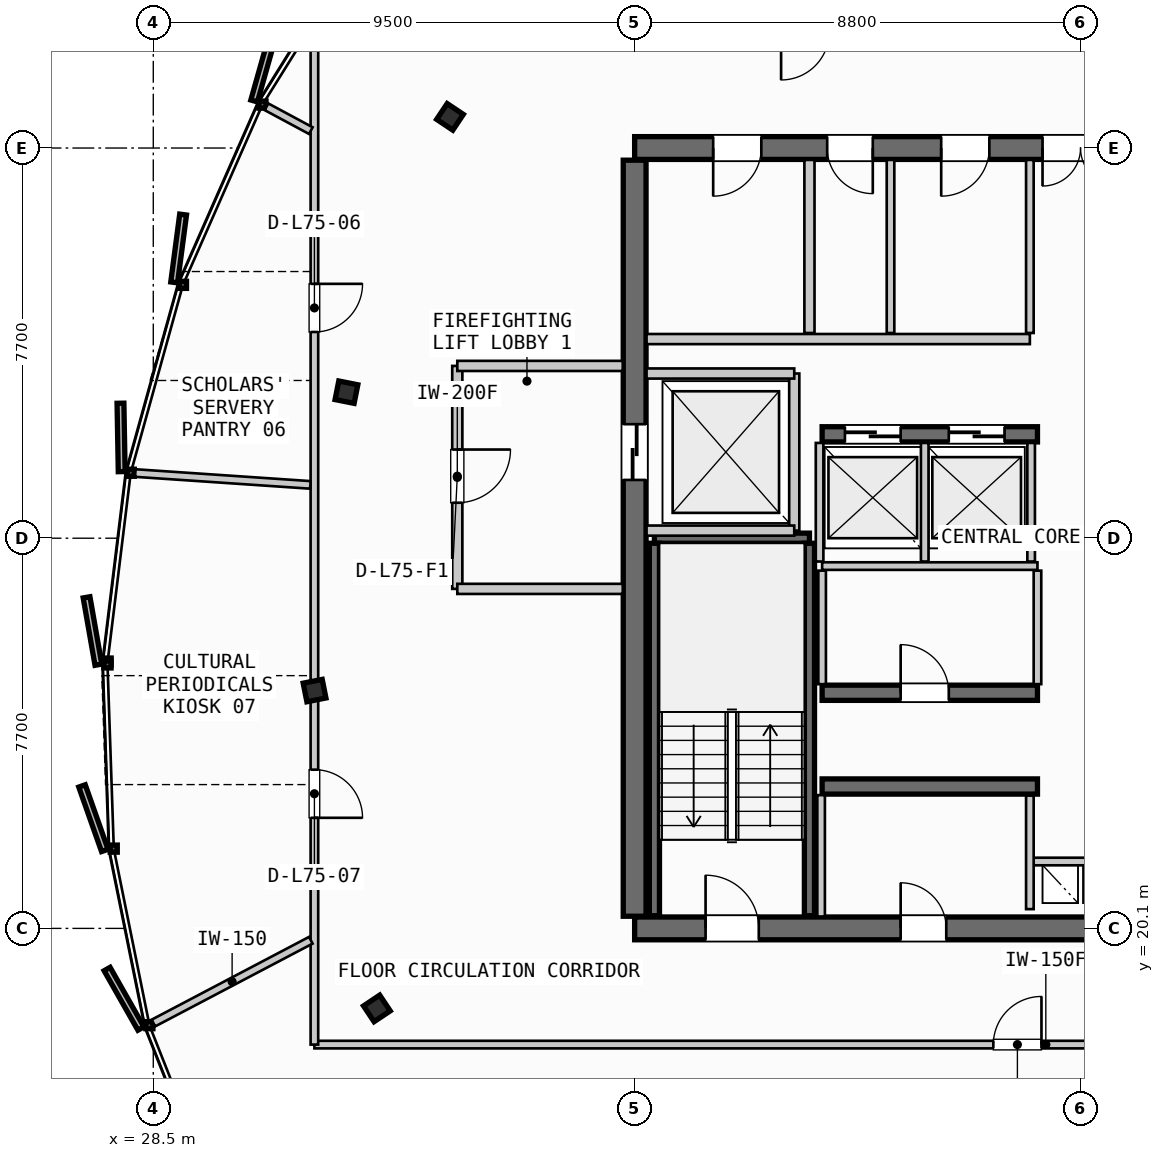
"""IFC4 building model, lengths in metres.
Left out: names, types, materials, properties, quantities, classifications, styles, units other than length and angle.
Written with IfcOpenShell. Run it as: python <this file> out.ifc"""

import sys

from ifc_helpers import new_model, si_unit, direction, frame, frame_2d, origin, origin_2d, place, context, subcontext, project, spatial, rectangle, i_section, extrude, source, transform, mapped, element, fill, save


model = new_model("IFC4")
c1 = context("Model", 3, precision=1e-05, world=origin(), true_north=direction((0.0, 1.0)))
c2 = subcontext(c1, "Body", "Model", "MODEL_VIEW")
j1 = project(units=[si_unit("LENGTHUNIT", "METRE"), si_unit("PLANEANGLEUNIT", "RADIAN")], contexts=[c1])
p1 = place(None, origin())
s1 = spatial("IfcSite", under=j1, at=p1, CompositionType="ELEMENT")
p2 = place(p1, origin())
s2 = spatial("IfcBuilding", under=s1, at=p2, CompositionType="ELEMENT")
p3 = place(p2, frame((0.0, 0.0, 283.6)))
s3 = spatial("IfcBuildingStorey", under=s2, at=p3, CompositionType="ELEMENT", Elevation=283.6)
p4 = place(p3, frame((38.0, 20.1, 0.0), z_axis=(0.0, 0.0, 1.0), x_axis=(1.0, 0.0, 0.0)))
e1 = element("IfcWall", 1, at=p4, inside=s3, PredefinedType="SHEAR", context=c2, shape_type="SweptSolid", body=[
    extrude(rectangle(XDim=17.6, YDim=0.45, at=frame_2d((8.8, 0.0))), origin(), (0.0, 0.0, 1.0), 3.21),
])
p5 = place(p4, frame((1.4, 0.0, 0.0)))
e2 = element("IfcOpeningElement", 2, at=p5, cuts=e1, PredefinedType="OPENING", context=c2, shape_type="SweptSolid", body=[
    extrude(rectangle(XDim=1.05, YDim=2.15, at=frame_2d((0.525, 1.075))), frame((0.0, 0.235, 0.0), z_axis=(0.0, -1.0, 0.0), x_axis=(1.0, 0.0, 0.0)), (0.0, 0.0, 1.0), 0.47),
])
p6 = place(p4, frame((15.15, 0.0, 0.0)))
e3 = element("IfcOpeningElement", 3, at=p6, cuts=e1, PredefinedType="OPENING", context=c2, shape_type="SweptSolid", body=[
    extrude(rectangle(XDim=1.05, YDim=2.15, at=frame_2d((0.525, 1.075))), frame((0.0, 0.235, 0.0), z_axis=(0.0, -1.0, 0.0), x_axis=(1.0, 0.0, 0.0)), (0.0, 0.0, 1.0), 0.47),
])
p7 = place(p4, frame((5.25, 0.0, 0.0)))
e4 = element("IfcOpeningElement", 4, at=p7, cuts=e1, PredefinedType="OPENING", context=c2, shape_type="SweptSolid", body=[
    extrude(rectangle(XDim=0.9, YDim=2.15, at=frame_2d((0.45, 1.075))), frame((0.0, 0.235, 0.0), z_axis=(0.0, -1.0, 0.0), x_axis=(1.0, 0.0, 0.0)), (0.0, 0.0, 1.0), 0.47),
])
p8 = place(p4, frame((11.4, 0.0, 0.0)))
e5 = element("IfcOpeningElement", 5, at=p8, cuts=e1, PredefinedType="OPENING", context=c2, shape_type="SweptSolid", body=[
    extrude(rectangle(XDim=0.95, YDim=2.15, at=frame_2d((0.475, 1.075))), frame((0.0, 0.235, 0.0), z_axis=(0.0, -1.0, 0.0), x_axis=(1.0, 0.0, 0.0)), (0.0, 0.0, 1.0), 0.47),
])
p9 = place(p3, frame((55.6, 35.5, 0.0), z_axis=(0.0, 0.0, 1.0), x_axis=(-1.0, 0.0, 0.0)))
e6 = element("IfcWall", 6, at=p9, inside=s3, PredefinedType="SHEAR", context=c2, shape_type="SweptSolid", body=[
    extrude(rectangle(XDim=17.6, YDim=0.45, at=frame_2d((8.8, 0.0))), origin(), (0.0, 0.0, 1.0), 3.21),
])
p10 = place(p9, frame((8.05, 0.0, 0.0)))
e7 = element("IfcOpeningElement", 7, at=p10, cuts=e6, PredefinedType="OPENING", context=c2, shape_type="SweptSolid", body=[
    extrude(rectangle(XDim=1.5, YDim=2.2, at=frame_2d((0.75, 1.1))), frame((0.0, 0.235, 0.0), z_axis=(0.0, -1.0, 0.0), x_axis=(1.0, 0.0, 0.0)), (0.0, 0.0, 1.0), 0.47),
])
p11 = place(p9, frame((15.1, 0.0, 0.0)))
e8 = element("IfcOpeningElement", 8, at=p11, cuts=e6, PredefinedType="OPENING", context=c2, shape_type="SweptSolid", body=[
    extrude(rectangle(XDim=0.95, YDim=2.15, at=frame_2d((0.475, 1.075))), frame((0.0, 0.235, 0.0), z_axis=(0.0, -1.0, 0.0), x_axis=(1.0, 0.0, 0.0)), (0.0, 0.0, 1.0), 0.47),
])
p12 = place(p9, frame((12.9, 0.0, 0.0)))
e9 = element("IfcOpeningElement", 9, at=p12, cuts=e6, PredefinedType="OPENING", context=c2, shape_type="SweptSolid", body=[
    extrude(rectangle(XDim=0.9, YDim=2.15, at=frame_2d((0.45, 1.075))), frame((0.0, 0.235, 0.0), z_axis=(0.0, -1.0, 0.0), x_axis=(1.0, 0.0, 0.0)), (0.0, 0.0, 1.0), 0.47),
])
p13 = place(p9, frame((10.6, 0.0, 0.0)))
e10 = element("IfcOpeningElement", 10, at=p13, cuts=e6, PredefinedType="OPENING", context=c2, shape_type="SweptSolid", body=[
    extrude(rectangle(XDim=0.95, YDim=2.15, at=frame_2d((0.475, 1.075))), frame((0.0, 0.235, 0.0), z_axis=(0.0, -1.0, 0.0), x_axis=(1.0, 0.0, 0.0)), (0.0, 0.0, 1.0), 0.47),
])
p14 = place(p3, frame((38.0, 35.26, 0.0), z_axis=(0.0, 0.0, 1.0), x_axis=(0.0, -1.0, 0.0)))
e11 = element("IfcWall", 11, at=p14, inside=s3, PredefinedType="SHEAR", context=c2, shape_type="SweptSolid", body=[
    extrude(rectangle(XDim=14.92, YDim=0.45, at=frame_2d((7.46, 0.0))), origin(), (0.0, 0.0, 1.0), 3.21),
])
p15 = place(p14, frame((5.21, 0.0, 0.0)))
e12 = element("IfcOpeningElement", 12, at=p15, cuts=e11, PredefinedType="OPENING", context=c2, shape_type="SweptSolid", body=[
    extrude(rectangle(XDim=1.1, YDim=2.2, at=frame_2d((0.55, 1.1))), frame((0.0, 0.235, 0.0), z_axis=(0.0, -1.0, 0.0), x_axis=(1.0, 0.0, 0.0)), (0.0, 0.0, 1.0), 0.47),
])
p16 = place(p3, frame((41.7, 22.9, 0.0), z_axis=(0.0, 0.0, 1.0), x_axis=(1.0, 0.0, 0.0)))
e13 = element("IfcWall", 13, at=p16, inside=s3, PredefinedType="SHEAR", context=c2, shape_type="SweptSolid", body=[
    extrude(rectangle(XDim=4.25, YDim=0.3, at=frame_2d((2.125, 0.0))), origin(), (0.0, 0.0, 1.0), 3.21),
])
p17 = place(p3, frame((41.7, 24.75, 0.0), z_axis=(0.0, 0.0, 1.0), x_axis=(1.0, 0.0, 0.0)))
e14 = element("IfcWall", 14, at=p17, inside=s3, PredefinedType="SHEAR", context=c2, shape_type="SweptSolid", body=[
    extrude(rectangle(XDim=4.25, YDim=0.3, at=frame_2d((2.125, 0.0))), origin(), (0.0, 0.0, 1.0), 3.21),
])
p18 = place(p17, frame((1.55, 0.0, 0.0)))
e15 = element("IfcOpeningElement", 15, at=p18, cuts=e14, PredefinedType="OPENING", context=c2, shape_type="SweptSolid", body=[
    extrude(rectangle(XDim=0.95, YDim=2.15, at=frame_2d((0.475, 1.075))), frame((0.0, 0.16, 0.0), z_axis=(0.0, -1.0, 0.0), x_axis=(1.0, 0.0, 0.0)), (0.0, 0.0, 1.0), 0.32),
])
p19 = place(p3, frame((41.7, 29.85, 0.0), z_axis=(0.0, 0.0, 1.0), x_axis=(1.0, 0.0, 0.0)))
e16 = element("IfcWall", 16, at=p19, inside=s3, PredefinedType="SHEAR", context=c2, shape_type="SweptSolid", body=[
    extrude(rectangle(XDim=4.25, YDim=0.3, at=frame_2d((2.125, 0.0))), origin(), (0.0, 0.0, 1.0), 3.21),
])
p20 = place(p19, frame((0.45, 0.0, 0.0)))
e17 = element("IfcOpeningElement", 17, at=p20, cuts=e16, PredefinedType="OPENING", context=c2, shape_type="SweptSolid", body=[
    extrude(rectangle(XDim=1.1, YDim=2.2, at=frame_2d((0.55, 1.1))), frame((0.0, 0.16, 0.0), z_axis=(0.0, -1.0, 0.0), x_axis=(1.0, 0.0, 0.0)), (0.0, 0.0, 1.0), 0.32),
])
p21 = place(p19, frame((2.5, 0.0, 0.0)))
e18 = element("IfcOpeningElement", 18, at=p21, cuts=e16, PredefinedType="OPENING", context=c2, shape_type="SweptSolid", body=[
    extrude(rectangle(XDim=1.1, YDim=2.2, at=frame_2d((0.55, 1.1))), frame((0.0, 0.16, 0.0), z_axis=(0.0, -1.0, 0.0), x_axis=(1.0, 0.0, 0.0)), (0.0, 0.0, 1.0), 0.32),
])
m1 = source(origin(), c2, "Body", "SweptSolid", [
    extrude(i_section(OverallWidth=0.374, OverallDepth=0.383, WebThickness=0.017, FlangeThickness=0.026, FilletRadius=0.015, at=origin_2d()), origin(), (0.0, 0.0, 1.0), 3.21),
])
for number, where, z_axis, x_axis in (
    (19, (34.356, 36.115, 0.0), (0.0, 0.0, 1.0), (-0.831, 0.556, 0.0)),
    (20, (32.312, 30.682, 0.0), (0.0, 0.0, 1.0), (-0.981, 0.195, 0.0)),
    (21, (31.683, 24.793, 0.0), (0.0, 0.0, 1.0), (-0.981, -0.195, 0.0)),
    (22, (32.913, 18.521, 0.0), (0.0, 0.0, 1.0), (-0.831, -0.556, 0.0)),
):
    element("IfcColumn", number, at=place(p3, frame(where, z_axis=z_axis, x_axis=x_axis)), inside=s3, PredefinedType="COLUMN", context=c2, shape_type="MappedRepresentation", body=[
        mapped(m1, transform((0.0, 0.0, 0.0), scale=1.0)),
    ])
p22 = place(p3, frame((38.39, 27.8, 0.0), z_axis=(0.0, 0.0, 1.0), x_axis=(1.0, 0.0, 0.0)))
e23 = element("IfcWall", 23, at=p22, inside=s3, PredefinedType="SHEAR", context=c2, shape_type="SweptSolid", body=[
    extrude(rectangle(XDim=3.06, YDim=0.2, at=frame_2d((1.53, 0.0))), origin(), (0.0, 0.0, 1.0), 3.21),
])
for number, where, z_axis, x_axis in (
    (24, (41.45, 27.7, 0.0), (0.0, 0.0, 1.0), (0.0, -1.0, 0.0)),
    (25, (38.39, 20.35, 0.0), (0.0, 0.0, 1.0), (0.0, 1.0, 0.0)),
):
    element("IfcWall", number, at=place(p3, frame(where, z_axis=z_axis, x_axis=x_axis)), inside=s3, PredefinedType="SHEAR", context=c2, shape_type="SweptSolid", body=[
        extrude(rectangle(XDim=7.35, YDim=0.2, at=frame_2d((3.675, 0.0))), origin(), (0.0, 0.0, 1.0), 3.21),
    ])
p23 = place(p3, frame((45.8, 21.42, 0.0), z_axis=(0.0, 0.0, 1.0), x_axis=(1.0, 0.0, 0.0)))
e26 = element("IfcWall", 26, at=p23, inside=s3, PredefinedType="PARTITIONING", context=c2, shape_type="SweptSolid", body=[
    extrude(rectangle(XDim=2.0, YDim=0.15, at=frame_2d((1.0, 0.0))), origin(), (0.0, 0.0, 1.0), 2.455),
])
p24 = place(p3, frame((45.8, 20.48, 0.0), z_axis=(0.0, 0.0, 1.0), x_axis=(0.0, 1.0, 0.0)))
e27 = element("IfcWall", 27, at=p24, inside=s3, PredefinedType="PARTITIONING", context=c2, shape_type="SweptSolid", body=[
    extrude(rectangle(XDim=2.24, YDim=0.15, at=frame_2d((1.12, 0.0))), origin(), (0.0, 0.0, 1.0), 2.455),
])
p25 = place(p3, frame((41.15, 27.95, 0.0), z_axis=(0.0, 0.0, 1.0), x_axis=(0.0, 1.0, 0.0)))
e28 = element("IfcWall", 28, at=p25, inside=s3, PredefinedType="PARTITIONING", context=c2, shape_type="SweptSolid", body=[
    extrude(rectangle(XDim=3.1, YDim=0.2, at=frame_2d((1.55, 0.0))), origin(), (0.0, 0.0, 1.0), 2.455),
])
for number, where, z_axis, x_axis in (
    (29, (38.235, 27.95, 0.0), (0.0, 0.0, 1.0), (1.0, 0.0, 0.0)),
    (30, (38.235, 31.05, 0.0), (0.0, 0.0, 1.0), (1.0, 0.0, 0.0)),
):
    element("IfcWall", number, at=place(p3, frame(where, z_axis=z_axis, x_axis=x_axis)), inside=s3, PredefinedType="PARTITIONING", context=c2, shape_type="SweptSolid", body=[
        extrude(rectangle(XDim=2.915, YDim=0.2, at=frame_2d((1.458, 0.0))), origin(), (0.0, 0.0, 1.0), 2.455),
    ])
p26 = place(p3, frame((34.5, 31.2, 0.0), z_axis=(0.0, 0.0, 1.0), x_axis=(0.0, -1.0, 0.0)))
e31 = element("IfcWall", 31, at=p26, inside=s3, PredefinedType="PARTITIONING", context=c2, shape_type="SweptSolid", body=[
    extrude(rectangle(XDim=4.4, YDim=0.2, at=frame_2d((2.2, 0.0))), origin(), (0.0, 0.0, 1.0), 2.455),
])
p27 = place(p26, frame((1.65, 0.0, 0.0)))
e32 = element("IfcOpeningElement", 32, at=p27, cuts=e31, PredefinedType="OPENING", context=c2, shape_type="SweptSolid", body=[
    extrude(rectangle(XDim=1.05, YDim=2.15, at=frame_2d((0.525, 1.075))), frame((0.0, 0.11, 0.0), z_axis=(0.0, -1.0, 0.0), x_axis=(1.0, 0.0, 0.0)), (0.0, 0.0, 1.0), 0.22),
])
for number, where, z_axis, x_axis in (
    (33, (34.5, 26.8, 0.0), (0.0, 0.0, 1.0), (1.0, 0.0, 0.0)),
    (34, (34.5, 31.2, 0.0), (0.0, 0.0, 1.0), (1.0, 0.0, 0.0)),
):
    element("IfcWall", number, at=place(p3, frame(where, z_axis=z_axis, x_axis=x_axis)), inside=s3, PredefinedType="PARTITIONING", context=c2, shape_type="SweptSolid", body=[
        extrude(rectangle(XDim=3.265, YDim=0.2, at=frame_2d((1.632, 0.0))), origin(), (0.0, 0.0, 1.0), 2.455),
    ])
p28 = place(p3, frame((41.68, 20.335, 0.0), z_axis=(0.0, 0.0, 1.0), x_axis=(0.0, 1.0, 0.0)))
e35 = element("IfcWall", 35, at=p28, inside=s3, PredefinedType="PARTITIONING", context=c2, shape_type="SweptSolid", body=[
    extrude(rectangle(XDim=2.395, YDim=0.15, at=frame_2d((1.198, 0.0))), origin(), (0.0, 0.0, 1.0), 2.455),
])
p29 = place(p3, frame((41.7, 27.25, 0.0), z_axis=(0.0, 0.0, 1.0), x_axis=(1.0, 0.0, 0.0)))
e36 = element("IfcWall", 36, at=p29, inside=s3, PredefinedType="PARTITIONING", context=c2, shape_type="SweptSolid", body=[
    extrude(rectangle(XDim=4.25, YDim=0.15, at=frame_2d((2.125, 0.0))), origin(), (0.0, 0.0, 1.0), 2.455),
])
for number, where, z_axis, x_axis in (
    (37, (41.7, 24.92, 0.0), (0.0, 0.0, 1.0), (0.0, 1.0, 0.0)),
    (38, (45.95, 24.92, 0.0), (0.0, 0.0, 1.0), (0.0, 1.0, 0.0)),
):
    element("IfcWall", number, at=place(p3, frame(where, z_axis=z_axis, x_axis=x_axis)), inside=s3, PredefinedType="PARTITIONING", context=c2, shape_type="SweptSolid", body=[
        extrude(rectangle(XDim=2.24, YDim=0.15, at=frame_2d((1.12, 0.0))), origin(), (0.0, 0.0, 1.0), 2.455),
    ])
for number, where, z_axis, x_axis in (
    (39, (41.65, 27.34, 0.0), (0.0, 0.0, 1.0), (0.0, 1.0, 0.0)),
    (40, (43.725, 27.34, 0.0), (0.0, 0.0, 1.0), (0.0, 1.0, 0.0)),
    (41, (45.825, 27.34, 0.0), (0.0, 0.0, 1.0), (0.0, 1.0, 0.0)),
):
    element("IfcWall", number, at=place(p3, frame(where, z_axis=z_axis, x_axis=x_axis)), inside=s3, PredefinedType="PARTITIONING", context=c2, shape_type="SweptSolid", body=[
        extrude(rectangle(XDim=2.34, YDim=0.15, at=frame_2d((1.17, 0.0))), origin(), (0.0, 0.0, 1.0), 2.455),
    ])
p30 = place(p3, frame((41.45, 31.85, 0.0), z_axis=(0.0, 0.0, 1.0), x_axis=(0.0, 1.0, 0.0)))
e42 = element("IfcWall", 42, at=p30, inside=s3, PredefinedType="PARTITIONING", context=c2, shape_type="SweptSolid", body=[
    extrude(rectangle(XDim=3.415, YDim=0.2, at=frame_2d((1.708, 0.0))), origin(), (0.0, 0.0, 1.0), 2.455),
])
p31 = place(p3, frame((38.235, 31.73, 0.0), z_axis=(0.0, 0.0, 1.0), x_axis=(1.0, 0.0, 0.0)))
e43 = element("IfcWall", 43, at=p31, inside=s3, PredefinedType="PARTITIONING", context=c2, shape_type="SweptSolid", body=[
    extrude(rectangle(XDim=7.565, YDim=0.2, at=frame_2d((3.782, 0.0))), origin(), (0.0, 0.0, 1.0), 2.455),
])
p32 = place(p3, frame((45.8, 31.85, 0.0), z_axis=(0.0, 0.0, 1.0), x_axis=(0.0, 1.0, 0.0)))
e44 = element("IfcWall", 44, at=p32, inside=s3, PredefinedType="PARTITIONING", context=c2, shape_type="SweptSolid", body=[
    extrude(rectangle(XDim=3.415, YDim=0.15, at=frame_2d((1.708, 0.0))), origin(), (0.0, 0.0, 1.0), 2.455),
])
p33 = place(p3, frame((43.05, 31.85, 0.0), z_axis=(0.0, 0.0, 1.0), x_axis=(0.0, 1.0, 0.0)))
e45 = element("IfcWall", 45, at=p33, inside=s3, PredefinedType="PLUMBINGWALL", context=c2, shape_type="SweptSolid", body=[
    extrude(rectangle(XDim=3.415, YDim=0.15, at=frame_2d((1.708, 0.0))), origin(), (0.0, 0.0, 1.0), 2.455),
])
p34 = place(p3, frame((31.68, 17.807, 0.0), z_axis=(0.0, 0.0, 1.0), x_axis=(1.0, 0.0, 0.0)))
e46 = element("IfcWall", 46, at=p34, inside=s3, PredefinedType="PARTITIONING", context=c2, shape_type="SweptSolid", body=[
    extrude(rectangle(XDim=28.87, YDim=0.15, at=frame_2d((14.435, 0.0))), origin(), (0.0, 0.0, 1.0), 2.455),
])
p35 = place(p34, frame((13.399, 0.0, 0.0)))
e47 = element("IfcOpeningElement", 47, at=p35, cuts=e46, PredefinedType="OPENING", context=c2, shape_type="SweptSolid", body=[
    extrude(rectangle(XDim=0.95, YDim=2.15, at=frame_2d((0.475, 1.075))), frame((0.0, 0.085, 0.0), z_axis=(0.0, -1.0, 0.0), x_axis=(1.0, 0.0, 0.0)), (0.0, 0.0, 1.0), 0.17),
])
p36 = place(p3, frame((31.68, 37.793, 0.0), z_axis=(0.0, 0.0, 1.0), x_axis=(0.0, -1.0, 0.0)))
e48 = element("IfcWall", 48, at=p36, inside=s3, PredefinedType="PARTITIONING", context=c2, shape_type="SweptSolid", body=[
    extrude(rectangle(XDim=19.986, YDim=0.15, at=frame_2d((9.993, 0.0))), origin(), (0.0, 0.0, 1.0), 2.455),
])
p37 = place(p36, frame((4.973, 0.0, 0.0)))
e49 = element("IfcOpeningElement", 49, at=p37, cuts=e48, PredefinedType="OPENING", context=c2, shape_type="SweptSolid", body=[
    extrude(rectangle(XDim=0.95, YDim=2.15, at=frame_2d((0.475, 1.075))), frame((0.0, 0.085, 0.0), z_axis=(0.0, -1.0, 0.0), x_axis=(1.0, 0.0, 0.0)), (0.0, 0.0, 1.0), 0.17),
])
p38 = place(p36, frame((14.561, 0.0, 0.0)))
e50 = element("IfcOpeningElement", 50, at=p38, cuts=e48, PredefinedType="OPENING", context=c2, shape_type="SweptSolid", body=[
    extrude(rectangle(XDim=0.95, YDim=2.15, at=frame_2d((0.475, 1.075))), frame((0.0, 0.085, 0.0), z_axis=(0.0, -1.0, 0.0), x_axis=(1.0, 0.0, 0.0)), (0.0, 0.0, 1.0), 0.17),
])
p39 = place(p3, frame((31.609, 19.866, 0.0), z_axis=(0.0, 0.0, 1.0), x_axis=(-0.885085653162, -0.465428175519, 0.0)))
e51 = element("IfcWall", 51, at=p39, inside=s3, PredefinedType="PARTITIONING", context=c2, shape_type="SweptSolid", body=[
    extrude(rectangle(XDim=3.51, YDim=0.15, at=frame_2d((1.755, 0.0))), origin(), (0.0, 0.0, 1.0), 2.455),
])
p40 = place(p3, frame((31.61, 35.844, 0.0), z_axis=(0.0, 0.0, 1.0), x_axis=(-0.880920446262, 0.47326437364, 0.0)))
e52 = element("IfcWall", 52, at=p40, inside=s3, PredefinedType="PARTITIONING", context=c2, shape_type="SweptSolid", body=[
    extrude(rectangle(XDim=0.994, YDim=0.15, at=frame_2d((0.497, 0.0))), origin(), (0.0, 0.0, 1.0), 2.455),
])
p41 = place(p3, frame((31.6, 28.852, 0.0), z_axis=(0.0, 0.0, 1.0), x_axis=(-0.997711556598, 0.067613976594, 0.0)))
e53 = element("IfcWall", 53, at=p41, inside=s3, PredefinedType="PARTITIONING", context=c2, shape_type="SweptSolid", body=[
    extrude(rectangle(XDim=3.463, YDim=0.15, at=frame_2d((1.731, 0.0))), origin(), (0.0, 0.0, 1.0), 2.455),
])
m2 = source(origin(), c2, "Body", "SweptSolid", [
    extrude(rectangle(XDim=1.05, YDim=2.15, at=frame_2d((0.525, 1.075))), frame((0.0, 0.025, 0.0), z_axis=(0.0, -1.0, 0.0), x_axis=(1.0, 0.0, 0.0)), (0.0, 0.0, 1.0), 0.05),
])
p42 = place(p5, origin())
e54 = element("IfcDoor", 54, at=p42, inside=s3, OperationType="SINGLE_SWING_LEFT", PredefinedType="DOOR", context=c2, shape_type="MappedRepresentation", body=[
    mapped(m2, transform((0.0, 0.0, 0.0), scale=1.0)),
])
fill(e2, e54)
m3 = source(origin(), c2, "Body", "SweptSolid", [
    extrude(rectangle(XDim=1.5, YDim=2.2, at=frame_2d((0.75, 1.1))), frame((0.0, 0.025, 0.0), z_axis=(0.0, -1.0, 0.0), x_axis=(1.0, 0.0, 0.0)), (0.0, 0.0, 1.0), 0.05),
])
p43 = place(p10, origin())
e55 = element("IfcDoor", 55, at=p43, inside=s3, OperationType="DOUBLE_DOOR_SINGLE_SWING", PredefinedType="DOOR", context=c2, shape_type="MappedRepresentation", body=[
    mapped(m3, transform((0.0, 0.0, 0.0), scale=1.0)),
])
fill(e7, e55)
m4 = source(origin(), c2, "Body", "SweptSolid", [
    extrude(rectangle(XDim=1.1, YDim=2.2, at=frame_2d((0.55, 1.1))), frame((0.0, 0.025, 0.0), z_axis=(0.0, -1.0, 0.0), x_axis=(1.0, 0.0, 0.0)), (0.0, 0.0, 1.0), 0.05),
])
p44 = place(p15, origin())
e56 = element("IfcDoor", 56, at=p44, inside=s3, OperationType="SLIDING_TO_LEFT", PredefinedType="DOOR", context=c2, shape_type="MappedRepresentation", body=[
    mapped(m4, transform((0.0, 0.0, 0.0), scale=1.0)),
])
fill(e12, e56)
m5 = source(origin(), c2, "Body", "SweptSolid", [
    extrude(rectangle(XDim=0.9, YDim=2.15, at=frame_2d((0.45, 1.075))), frame((0.0, 0.025, 0.0), z_axis=(0.0, -1.0, 0.0), x_axis=(1.0, 0.0, 0.0)), (0.0, 0.0, 1.0), 0.05),
])
p45 = place(p7, origin())
e57 = element("IfcDoor", 57, at=p45, inside=s3, OperationType="SINGLE_SWING_LEFT", PredefinedType="DOOR", context=c2, shape_type="MappedRepresentation", body=[
    mapped(m5, transform((0.0, 0.0, 0.0), scale=1.0)),
])
fill(e4, e57)
m6 = source(origin(), c2, "Body", "SweptSolid", [
    extrude(rectangle(XDim=0.95, YDim=2.15, at=frame_2d((0.475, 1.075))), frame((0.0, 0.025, 0.0), z_axis=(0.0, -1.0, 0.0), x_axis=(1.0, 0.0, 0.0)), (0.0, 0.0, 1.0), 0.05),
])
p46 = place(p18, origin())
e58 = element("IfcDoor", 58, at=p46, inside=s3, OperationType="SINGLE_SWING_LEFT", PredefinedType="DOOR", context=c2, shape_type="MappedRepresentation", body=[
    mapped(m6, transform((0.0, 0.0, 0.0), scale=1.0)),
])
fill(e15, e58)
p47 = place(p20, origin())
e59 = element("IfcDoor", 59, at=p47, inside=s3, OperationType="SLIDING_TO_LEFT", PredefinedType="DOOR", context=c2, shape_type="MappedRepresentation", body=[
    mapped(m4, transform((0.0, 0.0, 0.0), scale=1.0)),
])
fill(e17, e59)
p48 = place(p21, origin())
e60 = element("IfcDoor", 60, at=p48, inside=s3, OperationType="SLIDING_TO_LEFT", PredefinedType="DOOR", context=c2, shape_type="MappedRepresentation", body=[
    mapped(m4, transform((0.0, 0.0, 0.0), scale=1.0)),
])
fill(e18, e60)
p49 = place(p11, origin())
e61 = element("IfcDoor", 61, at=p49, inside=s3, OperationType="SINGLE_SWING_RIGHT", PredefinedType="DOOR", context=c2, shape_type="MappedRepresentation", body=[
    mapped(m6, transform((0.0, 0.0, 0.0), scale=1.0)),
])
fill(e8, e61)
p50 = place(p12, origin())
e62 = element("IfcDoor", 62, at=p50, inside=s3, OperationType="SINGLE_SWING_LEFT", PredefinedType="DOOR", context=c2, shape_type="MappedRepresentation", body=[
    mapped(m5, transform((0.0, 0.0, 0.0), scale=1.0)),
])
fill(e9, e62)
p51 = place(p13, origin())
e63 = element("IfcDoor", 63, at=p51, inside=s3, OperationType="SINGLE_SWING_RIGHT", PredefinedType="DOOR", context=c2, shape_type="MappedRepresentation", body=[
    mapped(m6, transform((0.0, 0.0, 0.0), scale=1.0)),
])
fill(e10, e63)
p52 = place(p27, origin())
e64 = element("IfcDoor", 64, at=p52, inside=s3, OperationType="SINGLE_SWING_LEFT", PredefinedType="DOOR", context=c2, shape_type="MappedRepresentation", body=[
    mapped(m2, transform((0.0, 0.0, 0.0), scale=1.0)),
])
fill(e32, e64)
p53 = place(p35, origin())
e65 = element("IfcDoor", 65, at=p53, inside=s3, OperationType="SINGLE_SWING_RIGHT", PredefinedType="DOOR", context=c2, shape_type="MappedRepresentation", body=[
    mapped(m6, transform((0.0, 0.0, 0.0), scale=1.0)),
])
fill(e47, e65)
p54 = place(p37, origin())
e66 = element("IfcDoor", 66, at=p54, inside=s3, OperationType="SINGLE_SWING_LEFT", PredefinedType="DOOR", context=c2, shape_type="MappedRepresentation", body=[
    mapped(m6, transform((0.0, 0.0, 0.0), scale=1.0)),
])
fill(e49, e66)
p55 = place(p38, origin())
e67 = element("IfcDoor", 67, at=p55, inside=s3, OperationType="SINGLE_SWING_RIGHT", PredefinedType="DOOR", context=c2, shape_type="MappedRepresentation", body=[
    mapped(m6, transform((0.0, 0.0, 0.0), scale=1.0)),
])
fill(e50, e67)
save(model, sys.argv[1])
